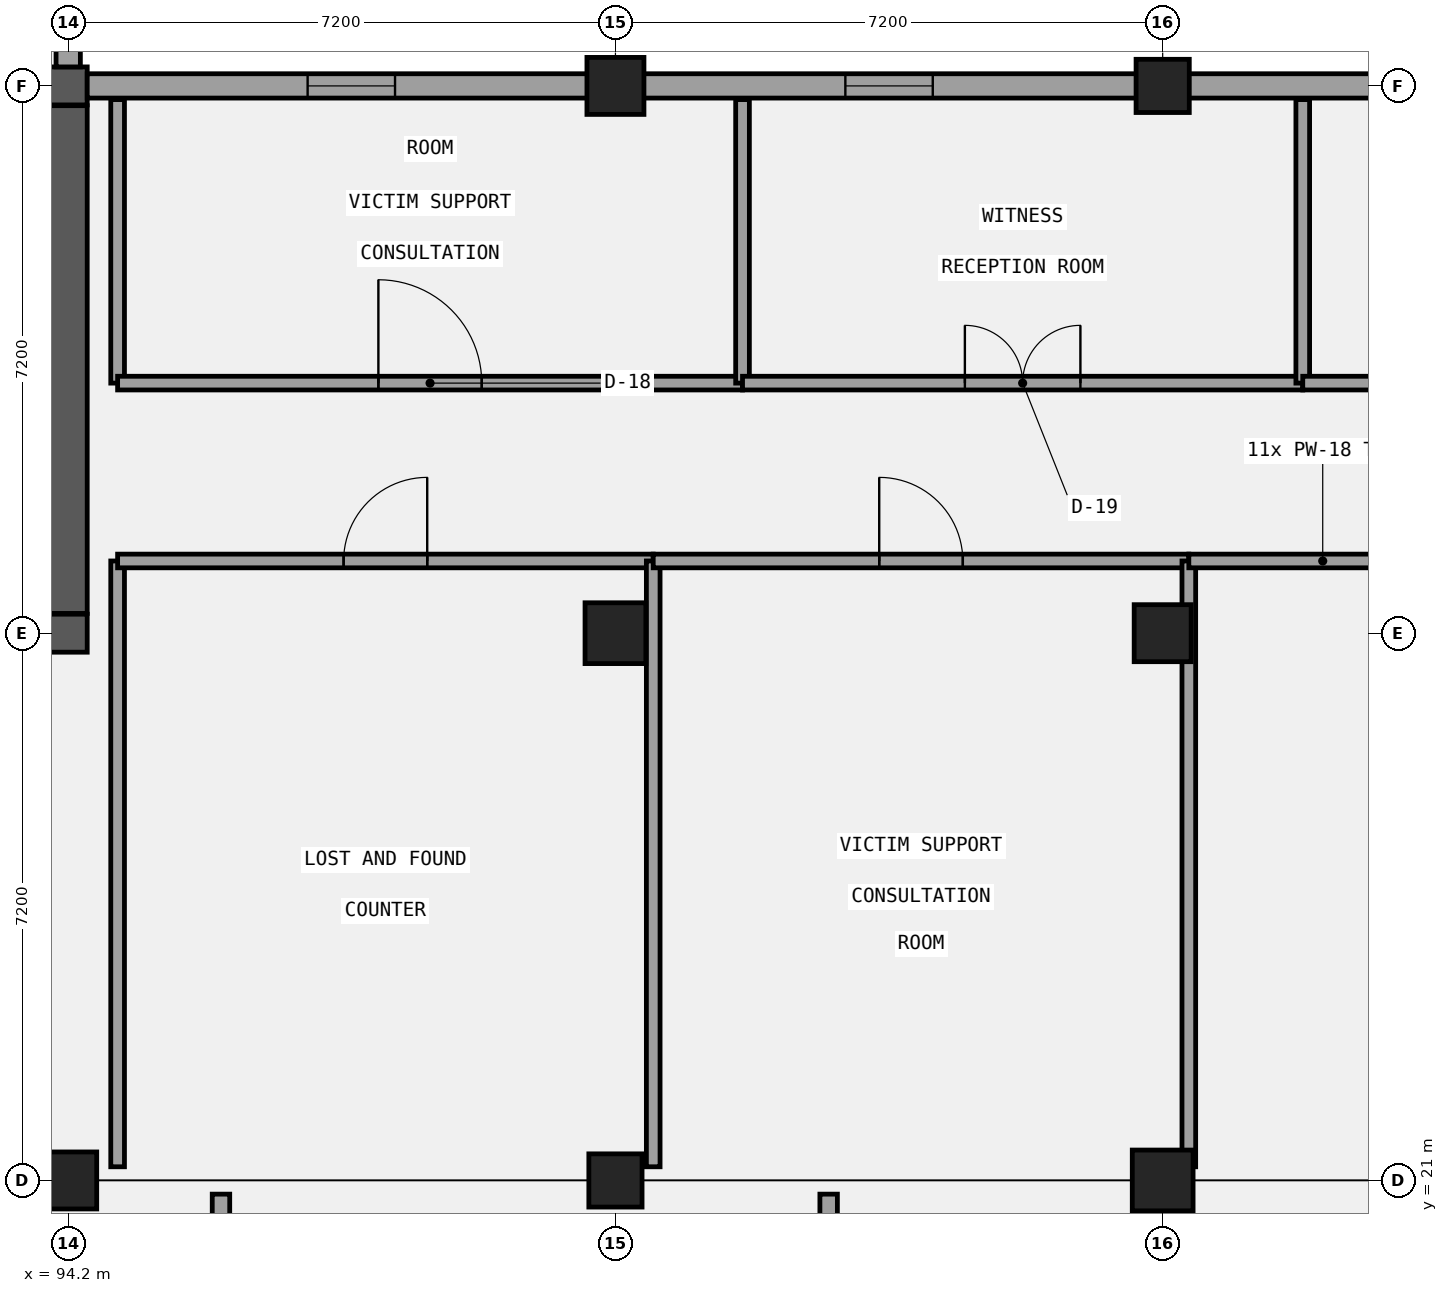
"""IFC4 building model, lengths in metres.
Left out: names, types, materials, properties, quantities, classifications, styles, units other than length and angle.
Written with IfcOpenShell. Run it as: python <this file> out.ifc"""

import sys

from ifc_helpers import new_model, si_unit, direction, frame, frame_2d, origin, origin_2d, place, context, subcontext, project, spatial, rectangle, extrude, element, fill, save


model = new_model("IFC4")
c1 = context("Model", 3, precision=1e-05, world=origin(), true_north=direction((0.0, 1.0)))
c2 = subcontext(c1, "Body", "Model", "MODEL_VIEW")
j1 = project(units=[si_unit("LENGTHUNIT", "METRE"), si_unit("PLANEANGLEUNIT", "RADIAN")], contexts=[c1])
p1 = place(None, origin())
s1 = spatial("IfcSite", under=j1, at=p1, CompositionType="ELEMENT")
p2 = place(p1, origin())
s2 = spatial("IfcBuilding", under=s1, at=p2, CompositionType="ELEMENT")
p3 = place(p2, origin())
s3 = spatial("IfcBuildingStorey", under=s2, at=p3, CompositionType="ELEMENT", Elevation=0.0)
p4 = place(p3, frame((79.55, 35.4, 0.0), z_axis=(0.0, 0.0, 1.0), x_axis=(1.0, 0.0, 0.0)))
e1 = element("IfcWall", 1, at=p4, inside=s3, PredefinedType="SHEAR", context=c2, shape_type="SweptSolid", body=[
    extrude(rectangle(XDim=14.9, YDim=0.5, at=frame_2d((7.45, 0.0))), origin(), (0.0, 0.0, 1.0), 5.4),
])
p5 = place(p3, frame((79.55, 28.2, 0.0), z_axis=(0.0, 0.0, 1.0), x_axis=(1.0, 0.0, 0.0)))
e2 = element("IfcWall", 2, at=p5, inside=s3, PredefinedType="SHEAR", context=c2, shape_type="SweptSolid", body=[
    extrude(rectangle(XDim=14.9, YDim=0.5, at=frame_2d((7.45, 0.0))), origin(), (0.0, 0.0, 1.0), 5.4),
])
p6 = place(p5, frame((3.8, 0.0, 0.0)))
e3 = element("IfcOpeningElement", 3, at=p6, cuts=e2, PredefinedType="OPENING", context=c2, shape_type="SweptSolid", body=[
    extrude(rectangle(XDim=1.3, YDim=2.2, at=frame_2d((0.65, 1.1))), frame((0.0, 0.26, 0.0), z_axis=(0.0, -1.0, 0.0), x_axis=(1.0, 0.0, 0.0)), (0.0, 0.0, 1.0), 0.52),
])
p7 = place(p3, frame((94.2, 28.46, 0.0), z_axis=(0.0, 0.0, 1.0), x_axis=(0.0, 1.0, 0.0)))
e4 = element("IfcWall", 4, at=p7, inside=s3, PredefinedType="SHEAR", context=c2, shape_type="SweptSolid", body=[
    extrude(rectangle(XDim=6.68, YDim=0.5, at=frame_2d((3.34, 0.0))), origin(), (0.0, 0.0, 1.0), 5.4),
])
p8 = place(p3, frame((94.2, 21.0, 0.0), z_axis=(0.0, 0.0, 1.0), x_axis=(1.0, 0.0, 0.0)))
e5 = element("IfcColumn", 5, at=p8, inside=s3, PredefinedType="COLUMN", context=c2, shape_type="SweptSolid", body=[
    extrude(rectangle(XDim=0.75, YDim=0.75, at=origin_2d()), origin(), (0.0, 0.0, 1.0), 5.4),
])
p9 = place(p3, frame((101.4, 21.0, 0.0), z_axis=(0.0, 0.0, 1.0), x_axis=(1.0, 0.0, 0.0)))
e6 = element("IfcColumn", 6, at=p9, inside=s3, PredefinedType="COLUMN", context=c2, shape_type="SweptSolid", body=[
    extrude(rectangle(XDim=0.7, YDim=0.7, at=origin_2d()), origin(), (0.0, 0.0, 1.0), 5.4),
])
p10 = place(p3, frame((101.4, 28.2, 0.0), z_axis=(0.0, 0.0, 1.0), x_axis=(1.0, 0.0, 0.0)))
e7 = element("IfcColumn", 7, at=p10, inside=s3, PredefinedType="COLUMN", context=c2, shape_type="SweptSolid", body=[
    extrude(rectangle(XDim=0.8, YDim=0.8, at=origin_2d()), origin(), (0.0, 0.0, 1.0), 5.4),
])
p11 = place(p3, frame((101.4, 35.4, 0.0), z_axis=(0.0, 0.0, 1.0), x_axis=(1.0, 0.0, 0.0)))
e8 = element("IfcColumn", 8, at=p11, inside=s3, PredefinedType="COLUMN", context=c2, shape_type="SweptSolid", body=[
    extrude(rectangle(XDim=0.75, YDim=0.75, at=origin_2d()), origin(), (0.0, 0.0, 1.0), 5.4),
])
p12 = place(p3, frame((108.6, 21.0, 0.0), z_axis=(0.0, 0.0, 1.0), x_axis=(1.0, 0.0, 0.0)))
e9 = element("IfcColumn", 9, at=p12, inside=s3, PredefinedType="COLUMN", context=c2, shape_type="SweptSolid", body=[
    extrude(rectangle(XDim=0.8, YDim=0.8, at=origin_2d()), origin(), (0.0, 0.0, 1.0), 5.4),
])
p13 = place(p3, frame((108.6, 28.2, 0.0), z_axis=(0.0, 0.0, 1.0), x_axis=(1.0, 0.0, 0.0)))
e10 = element("IfcColumn", 10, at=p13, inside=s3, PredefinedType="COLUMN", context=c2, shape_type="SweptSolid", body=[
    extrude(rectangle(XDim=0.75, YDim=0.75, at=origin_2d()), origin(), (0.0, 0.0, 1.0), 5.4),
])
p14 = place(p3, frame((108.6, 35.4, 0.0), z_axis=(0.0, 0.0, 1.0), x_axis=(1.0, 0.0, 0.0)))
e11 = element("IfcColumn", 11, at=p14, inside=s3, PredefinedType="COLUMN", context=c2, shape_type="SweptSolid", body=[
    extrude(rectangle(XDim=0.7, YDim=0.7, at=origin_2d()), origin(), (0.0, 0.0, 1.0), 5.4),
])
p15 = place(p3, frame((94.2, 35.65, 0.0), z_axis=(0.0, 0.0, 1.0), x_axis=(0.0, 1.0, 0.0)))
e12 = element("IfcWall", 12, at=p15, inside=s3, PredefinedType="SOLIDWALL", context=c2, shape_type="SweptSolid", body=[
    extrude(rectangle(XDim=42.79, YDim=0.32, at=frame_2d((21.395, 0.0))), origin(), (0.0, 0.0, 1.0), 4.12),
])
p16 = place(p15, frame((2.975, 0.0, 1.0)))
e13 = element("IfcOpeningElement", 13, at=p16, cuts=e12, PredefinedType="OPENING", context=c2, shape_type="SweptSolid", body=[
    extrude(rectangle(XDim=1.0, YDim=1.65, at=frame_2d((0.5, 0.825))), frame((0.0, 0.17, 0.0), z_axis=(0.0, -1.0, 0.0), x_axis=(1.0, 0.0, 0.0)), (0.0, 0.0, 1.0), 0.34),
])
p17 = place(p15, frame((10.05, 0.0, 1.0)))
e14 = element("IfcOpeningElement", 14, at=p17, cuts=e12, PredefinedType="OPENING", context=c2, shape_type="SweptSolid", body=[
    extrude(rectangle(XDim=1.0, YDim=1.65, at=frame_2d((0.5, 0.825))), frame((0.0, 0.17, 0.0), z_axis=(0.0, -1.0, 0.0), x_axis=(1.0, 0.0, 0.0)), (0.0, 0.0, 1.0), 0.34),
])
p18 = place(p15, frame((17.25, 0.0, 1.0)))
e15 = element("IfcOpeningElement", 15, at=p18, cuts=e12, PredefinedType="OPENING", context=c2, shape_type="SweptSolid", body=[
    extrude(rectangle(XDim=1.0, YDim=1.65, at=frame_2d((0.5, 0.825))), frame((0.0, 0.17, 0.0), z_axis=(0.0, -1.0, 0.0), x_axis=(1.0, 0.0, 0.0)), (0.0, 0.0, 1.0), 0.34),
])
p19 = place(p15, frame((24.45, 0.0, 1.0)))
e16 = element("IfcOpeningElement", 16, at=p19, cuts=e12, PredefinedType="OPENING", context=c2, shape_type="SweptSolid", body=[
    extrude(rectangle(XDim=1.0, YDim=1.65, at=frame_2d((0.5, 0.825))), frame((0.0, 0.17, 0.0), z_axis=(0.0, -1.0, 0.0), x_axis=(1.0, 0.0, 0.0)), (0.0, 0.0, 1.0), 0.34),
])
p20 = place(p15, frame((31.65, 0.0, 1.0)))
e17 = element("IfcOpeningElement", 17, at=p20, cuts=e12, PredefinedType="OPENING", context=c2, shape_type="SweptSolid", body=[
    extrude(rectangle(XDim=1.0, YDim=1.65, at=frame_2d((0.5, 0.825))), frame((0.0, 0.17, 0.0), z_axis=(0.0, -1.0, 0.0), x_axis=(1.0, 0.0, 0.0)), (0.0, 0.0, 1.0), 0.34),
])
p21 = place(p15, frame((38.77, 0.0, 1.0)))
e18 = element("IfcOpeningElement", 18, at=p21, cuts=e12, PredefinedType="OPENING", context=c2, shape_type="SweptSolid", body=[
    extrude(rectangle(XDim=1.0, YDim=1.65, at=frame_2d((0.5, 0.825))), frame((0.0, 0.17, 0.0), z_axis=(0.0, -1.0, 0.0), x_axis=(1.0, 0.0, 0.0)), (0.0, 0.0, 1.0), 0.34),
])
p22 = place(p3, frame((144.76, 35.4, 0.0), z_axis=(0.0, 0.0, 1.0), x_axis=(-1.0, 0.0, 0.0)))
e19 = element("IfcWall", 19, at=p22, inside=s3, PredefinedType="SOLIDWALL", context=c2, shape_type="SweptSolid", body=[
    extrude(rectangle(XDim=50.31, YDim=0.32, at=frame_2d((25.155, 0.0))), origin(), (0.0, 0.0, 1.0), 4.12),
])
p23 = place(p22, frame((46.26, 0.0, 1.0)))
e20 = element("IfcOpeningElement", 20, at=p23, cuts=e19, PredefinedType="OPENING", context=c2, shape_type="SweptSolid", body=[
    extrude(rectangle(XDim=1.15, YDim=1.4, at=frame_2d((0.575, 0.7))), frame((0.0, 0.17, 0.0), z_axis=(0.0, -1.0, 0.0), x_axis=(1.0, 0.0, 0.0)), (0.0, 0.0, 1.0), 0.34),
])
p24 = place(p22, frame((39.185, 0.0, 1.0)))
e21 = element("IfcOpeningElement", 21, at=p24, cuts=e19, PredefinedType="OPENING", context=c2, shape_type="SweptSolid", body=[
    extrude(rectangle(XDim=1.15, YDim=1.4, at=frame_2d((0.575, 0.7))), frame((0.0, 0.17, 0.0), z_axis=(0.0, -1.0, 0.0), x_axis=(1.0, 0.0, 0.0)), (0.0, 0.0, 1.0), 0.34),
])
p25 = place(p22, frame((31.985, 0.0, 1.0)))
e22 = element("IfcOpeningElement", 22, at=p25, cuts=e19, PredefinedType="OPENING", context=c2, shape_type="SweptSolid", body=[
    extrude(rectangle(XDim=1.15, YDim=1.4, at=frame_2d((0.575, 0.7))), frame((0.0, 0.17, 0.0), z_axis=(0.0, -1.0, 0.0), x_axis=(1.0, 0.0, 0.0)), (0.0, 0.0, 1.0), 0.34),
])
p26 = place(p22, frame((24.785, 0.0, 1.0)))
e23 = element("IfcOpeningElement", 23, at=p26, cuts=e19, PredefinedType="OPENING", context=c2, shape_type="SweptSolid", body=[
    extrude(rectangle(XDim=1.15, YDim=1.4, at=frame_2d((0.575, 0.7))), frame((0.0, 0.17, 0.0), z_axis=(0.0, -1.0, 0.0), x_axis=(1.0, 0.0, 0.0)), (0.0, 0.0, 1.0), 0.34),
])
p27 = place(p22, frame((17.585, 0.0, 1.0)))
e24 = element("IfcOpeningElement", 24, at=p27, cuts=e19, PredefinedType="OPENING", context=c2, shape_type="SweptSolid", body=[
    extrude(rectangle(XDim=1.15, YDim=1.4, at=frame_2d((0.575, 0.7))), frame((0.0, 0.17, 0.0), z_axis=(0.0, -1.0, 0.0), x_axis=(1.0, 0.0, 0.0)), (0.0, 0.0, 1.0), 0.34),
])
p28 = place(p22, frame((10.385, 0.0, 1.0)))
e25 = element("IfcOpeningElement", 25, at=p28, cuts=e19, PredefinedType="OPENING", context=c2, shape_type="SweptSolid", body=[
    extrude(rectangle(XDim=1.15, YDim=1.4, at=frame_2d((0.575, 0.7))), frame((0.0, 0.17, 0.0), z_axis=(0.0, -1.0, 0.0), x_axis=(1.0, 0.0, 0.0)), (0.0, 0.0, 1.0), 0.34),
])
p29 = place(p22, frame((3.185, 0.0, 1.0)))
e26 = element("IfcOpeningElement", 26, at=p29, cuts=e19, PredefinedType="OPENING", context=c2, shape_type="SweptSolid", body=[
    extrude(rectangle(XDim=1.15, YDim=1.4, at=frame_2d((0.575, 0.7))), frame((0.0, 0.17, 0.0), z_axis=(0.0, -1.0, 0.0), x_axis=(1.0, 0.0, 0.0)), (0.0, 0.0, 1.0), 0.34),
])
p30 = place(p3, frame((94.85, 21.18, 0.0), z_axis=(0.0, 0.0, 1.0), x_axis=(0.0, 1.0, 0.0)))
e27 = element("IfcWall", 27, at=p30, inside=s3, PredefinedType="PARTITIONING", context=c2, shape_type="SweptSolid", body=[
    extrude(rectangle(XDim=7.97, YDim=0.18, at=frame_2d((3.985, 0.0))), origin(), (0.0, 0.0, 1.0), 5.12),
])
p31 = place(p3, frame((94.85, 29.15, 0.0), z_axis=(0.0, 0.0, 1.0), x_axis=(1.0, 0.0, 0.0)))
e28 = element("IfcWall", 28, at=p31, inside=s3, PredefinedType="PARTITIONING", context=c2, shape_type="SweptSolid", body=[
    extrude(rectangle(XDim=7.047, YDim=0.18, at=frame_2d((3.523, 0.0))), origin(), (0.0, 0.0, 1.0), 5.12),
])
p32 = place(p31, frame((2.973, 0.0, 0.0)))
e29 = element("IfcOpeningElement", 29, at=p32, cuts=e28, PredefinedType="OPENING", context=c2, shape_type="SweptSolid", body=[
    extrude(rectangle(XDim=1.1, YDim=2.22, at=frame_2d((0.55, 1.11))), frame((0.0, 0.1, 0.0), z_axis=(0.0, -1.0, 0.0), x_axis=(1.0, 0.0, 0.0)), (0.0, 0.0, 1.0), 0.2),
])
p33 = place(p3, frame((101.897, 21.18, 0.0), z_axis=(0.0, 0.0, 1.0), x_axis=(0.0, 1.0, 0.0)))
e30 = element("IfcWall", 30, at=p33, inside=s3, PredefinedType="PARTITIONING", context=c2, shape_type="SweptSolid", body=[
    extrude(rectangle(XDim=7.97, YDim=0.18, at=frame_2d((3.985, 0.0))), origin(), (0.0, 0.0, 1.0), 5.12),
])
p34 = place(p3, frame((101.897, 29.15, 0.0), z_axis=(0.0, 0.0, 1.0), x_axis=(1.0, 0.0, 0.0)))
e31 = element("IfcWall", 31, at=p34, inside=s3, PredefinedType="PARTITIONING", context=c2, shape_type="SweptSolid", body=[
    extrude(rectangle(XDim=7.047, YDim=0.18, at=frame_2d((3.523, 0.0))), origin(), (0.0, 0.0, 1.0), 5.12),
])
p35 = place(p34, frame((2.973, 0.0, 0.0)))
e32 = element("IfcOpeningElement", 32, at=p35, cuts=e31, PredefinedType="OPENING", context=c2, shape_type="SweptSolid", body=[
    extrude(rectangle(XDim=1.1, YDim=2.35, at=frame_2d((0.55, 1.175))), frame((0.0, 0.1, 0.0), z_axis=(0.0, -1.0, 0.0), x_axis=(1.0, 0.0, 0.0)), (0.0, 0.0, 1.0), 0.2),
])
p36 = place(p3, frame((108.944, 21.18, 0.0), z_axis=(0.0, 0.0, 1.0), x_axis=(0.0, 1.0, 0.0)))
e33 = element("IfcWall", 33, at=p36, inside=s3, PredefinedType="PARTITIONING", context=c2, shape_type="SweptSolid", body=[
    extrude(rectangle(XDim=7.97, YDim=0.18, at=frame_2d((3.985, 0.0))), origin(), (0.0, 0.0, 1.0), 4.27),
])
p37 = place(p3, frame((108.944, 29.15, 0.0), z_axis=(0.0, 0.0, 1.0), x_axis=(1.0, 0.0, 0.0)))
e34 = element("IfcWall", 34, at=p37, inside=s3, PredefinedType="PARTITIONING", context=c2, shape_type="SweptSolid", body=[
    extrude(rectangle(XDim=7.047, YDim=0.18, at=frame_2d((3.523, 0.0))), origin(), (0.0, 0.0, 1.0), 5.12),
])
p38 = place(p37, frame((2.914, 0.0, 0.0)))
e35 = element("IfcOpeningElement", 35, at=p38, cuts=e34, PredefinedType="OPENING", context=c2, shape_type="SweptSolid", body=[
    extrude(rectangle(XDim=1.22, YDim=2.1, at=frame_2d((0.61, 1.05))), frame((0.0, 0.1, 0.0), z_axis=(0.0, -1.0, 0.0), x_axis=(1.0, 0.0, 0.0)), (0.0, 0.0, 1.0), 0.2),
])
p39 = place(p3, frame((94.85, 31.49, 0.0), z_axis=(0.0, 0.0, 1.0), x_axis=(0.0, 1.0, 0.0)))
e36 = element("IfcWall", 36, at=p39, inside=s3, PredefinedType="PARTITIONING", context=c2, shape_type="SweptSolid", body=[
    extrude(rectangle(XDim=3.73, YDim=0.18, at=frame_2d((1.865, 0.0))), origin(), (0.0, 0.0, 1.0), 5.12),
])
p40 = place(p3, frame((94.85, 31.49, 0.0), z_axis=(0.0, 0.0, 1.0), x_axis=(1.0, 0.0, 0.0)))
e37 = element("IfcWall", 37, at=p40, inside=s3, PredefinedType="PARTITIONING", context=c2, shape_type="SweptSolid", body=[
    extrude(rectangle(XDim=8.222, YDim=0.18, at=frame_2d((4.111, 0.0))), origin(), (0.0, 0.0, 1.0), 5.12),
])
p41 = place(p40, frame((3.431, 0.0, 0.0)))
e38 = element("IfcOpeningElement", 38, at=p41, cuts=e37, PredefinedType="OPENING", context=c2, shape_type="SweptSolid", body=[
    extrude(rectangle(XDim=1.36, YDim=2.35, at=frame_2d((0.68, 1.175))), frame((0.0, 0.1, 0.0), z_axis=(0.0, -1.0, 0.0), x_axis=(1.0, 0.0, 0.0)), (0.0, 0.0, 1.0), 0.2),
])
p42 = place(p3, frame((103.072, 31.49, 0.0), z_axis=(0.0, 0.0, 1.0), x_axis=(0.0, 1.0, 0.0)))
e39 = element("IfcWall", 39, at=p42, inside=s3, PredefinedType="PARTITIONING", context=c2, shape_type="SweptSolid", body=[
    extrude(rectangle(XDim=3.73, YDim=0.18, at=frame_2d((1.865, 0.0))), origin(), (0.0, 0.0, 1.0), 5.12),
])
p43 = place(p3, frame((103.072, 31.49, 0.0), z_axis=(0.0, 0.0, 1.0), x_axis=(1.0, 0.0, 0.0)))
e40 = element("IfcWall", 40, at=p43, inside=s3, PredefinedType="PARTITIONING", context=c2, shape_type="SweptSolid", body=[
    extrude(rectangle(XDim=7.371, YDim=0.18, at=frame_2d((3.686, 0.0))), origin(), (0.0, 0.0, 1.0), 5.12),
])
p44 = place(p43, frame((2.926, 0.0, 0.0)))
e41 = element("IfcOpeningElement", 41, at=p44, cuts=e40, PredefinedType="OPENING", context=c2, shape_type="SweptSolid", body=[
    extrude(rectangle(XDim=1.52, YDim=2.1, at=frame_2d((0.76, 1.05))), frame((0.0, 0.1, 0.0), z_axis=(0.0, -1.0, 0.0), x_axis=(1.0, 0.0, 0.0)), (0.0, 0.0, 1.0), 0.2),
])
p45 = place(p3, frame((110.443, 31.49, 0.0), z_axis=(0.0, 0.0, 1.0), x_axis=(0.0, 1.0, 0.0)))
e42 = element("IfcWall", 42, at=p45, inside=s3, PredefinedType="PARTITIONING", context=c2, shape_type="SweptSolid", body=[
    extrude(rectangle(XDim=3.73, YDim=0.18, at=frame_2d((1.865, 0.0))), origin(), (0.0, 0.0, 1.0), 5.12),
])
p46 = place(p3, frame((110.443, 31.49, 0.0), z_axis=(0.0, 0.0, 1.0), x_axis=(1.0, 0.0, 0.0)))
e43 = element("IfcWall", 43, at=p46, inside=s3, PredefinedType="PARTITIONING", context=c2, shape_type="SweptSolid", body=[
    extrude(rectangle(XDim=10.522, YDim=0.18, at=frame_2d((5.261, 0.0))), origin(), (0.0, 0.0, 1.0), 5.12),
])
p47 = place(p46, frame((4.501, 0.0, 0.0)))
e44 = element("IfcOpeningElement", 44, at=p47, cuts=e43, PredefinedType="OPENING", context=c2, shape_type="SweptSolid", body=[
    extrude(rectangle(XDim=1.52, YDim=2.22, at=frame_2d((0.76, 1.11))), frame((0.0, 0.1, 0.0), z_axis=(0.0, -1.0, 0.0), x_axis=(1.0, 0.0, 0.0)), (0.0, 0.0, 1.0), 0.2),
])
for number, where, z_axis, x_axis in (
    (45, (96.21, 11.67, 0.0), (0.0, 0.0, 1.0), (0.0, 1.0, 0.0)),
    (46, (104.205, 11.67, 0.0), (0.0, 0.0, 1.0), (0.0, 1.0, 0.0)),
):
    element("IfcWall", number, at=place(p3, frame(where, z_axis=z_axis, x_axis=x_axis)), inside=s3, PredefinedType="PARTITIONING", context=c2, shape_type="SweptSolid", body=[
        extrude(rectangle(XDim=9.15, YDim=0.23, at=frame_2d((4.575, 0.0))), origin(), (0.0, 0.0, 1.0), 5.12),
    ])
p48 = place(p23, origin())
e47 = element("IfcWindow", 47, at=p48, inside=s3, PartitioningType="SINGLE_PANEL", PredefinedType="WINDOW", context=c2, shape_type="SweptSolid", body=[
    extrude(rectangle(XDim=1.15, YDim=1.4, at=frame_2d((0.575, 0.7))), frame((0.0, 0.03, 0.0), z_axis=(0.0, -1.0, 0.0), x_axis=(1.0, 0.0, 0.0)), (0.0, 0.0, 1.0), 0.06),
])
fill(e20, e47)
p49 = place(p24, origin())
e48 = element("IfcWindow", 48, at=p49, inside=s3, PartitioningType="SINGLE_PANEL", PredefinedType="WINDOW", context=c2, shape_type="SweptSolid", body=[
    extrude(rectangle(XDim=1.15, YDim=1.4, at=frame_2d((0.575, 0.7))), frame((0.0, 0.03, 0.0), z_axis=(0.0, -1.0, 0.0), x_axis=(1.0, 0.0, 0.0)), (0.0, 0.0, 1.0), 0.06),
])
fill(e21, e48)
p50 = place(p32, frame((1.1, 0.0, 0.0), z_axis=(0.0, 0.0, 1.0), x_axis=(-1.0, 0.0, 0.0)))
e49 = element("IfcDoor", 49, at=p50, inside=s3, OperationType="SINGLE_SWING_RIGHT", PredefinedType="DOOR", context=c2, shape_type="SweptSolid", body=[
    extrude(rectangle(XDim=1.1, YDim=2.22, at=frame_2d((0.55, 1.11))), frame((0.0, 0.025, 0.0), z_axis=(0.0, -1.0, 0.0), x_axis=(1.0, 0.0, 0.0)), (0.0, 0.0, 1.0), 0.05),
])
fill(e29, e49)
p51 = place(p35, frame((1.1, 0.0, 0.0), z_axis=(0.0, 0.0, 1.0), x_axis=(-1.0, 0.0, 0.0)))
e50 = element("IfcDoor", 50, at=p51, inside=s3, OperationType="SINGLE_SWING_LEFT", PredefinedType="DOOR", context=c2, shape_type="SweptSolid", body=[
    extrude(rectangle(XDim=1.1, YDim=2.35, at=frame_2d((0.55, 1.175))), frame((0.0, 0.025, 0.0), z_axis=(0.0, -1.0, 0.0), x_axis=(1.0, 0.0, 0.0)), (0.0, 0.0, 1.0), 0.05),
])
fill(e32, e50)
p52 = place(p41, origin())
e51 = element("IfcDoor", 51, at=p52, inside=s3, OperationType="SINGLE_SWING_LEFT", PredefinedType="DOOR", context=c2, shape_type="SweptSolid", body=[
    extrude(rectangle(XDim=1.36, YDim=2.35, at=frame_2d((0.68, 1.175))), frame((0.0, 0.025, 0.0), z_axis=(0.0, -1.0, 0.0), x_axis=(1.0, 0.0, 0.0)), (0.0, 0.0, 1.0), 0.05),
])
fill(e38, e51)
p53 = place(p44, origin())
e52 = element("IfcDoor", 52, at=p53, inside=s3, OperationType="DOUBLE_DOOR_SINGLE_SWING", PredefinedType="DOOR", context=c2, shape_type="SweptSolid", body=[
    extrude(rectangle(XDim=1.52, YDim=2.1, at=frame_2d((0.76, 1.05))), frame((0.0, 0.025, 0.0), z_axis=(0.0, -1.0, 0.0), x_axis=(1.0, 0.0, 0.0)), (0.0, 0.0, 1.0), 0.05),
])
fill(e41, e52)
save(model, sys.argv[1])
